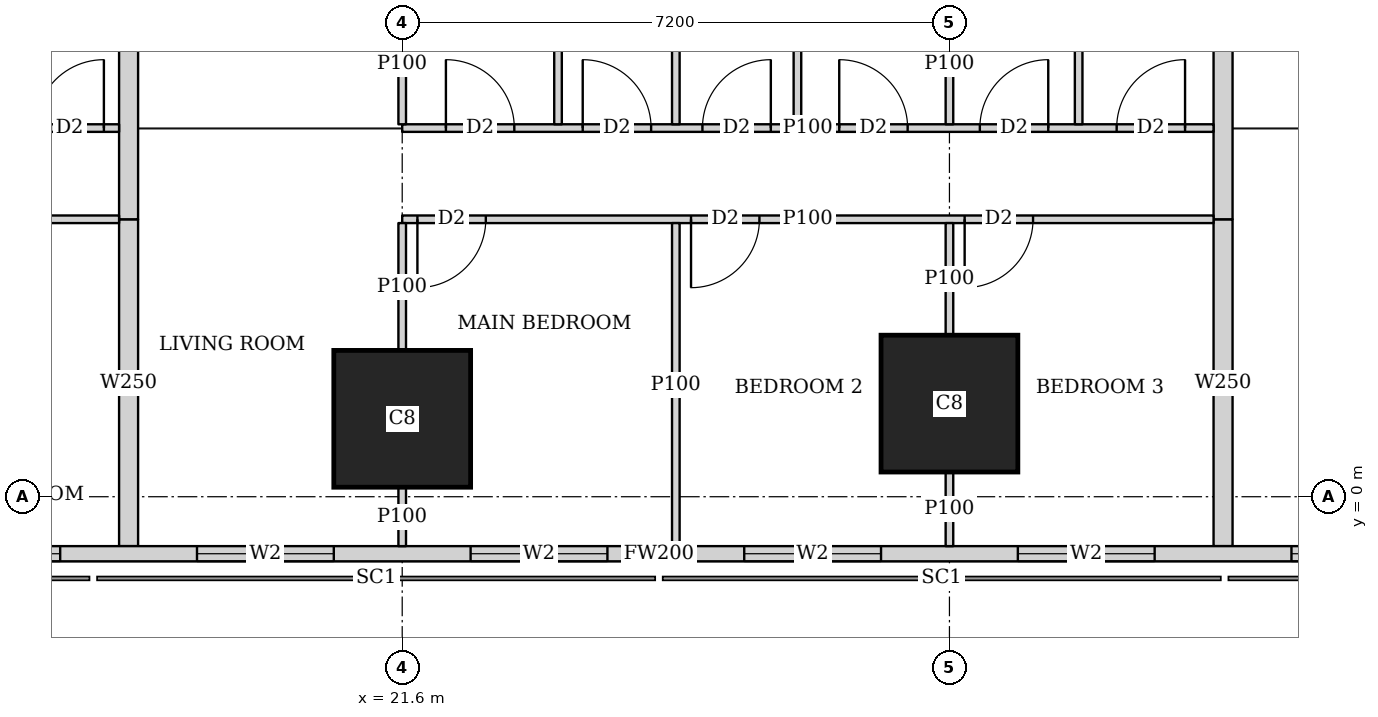
"""IFC4 building model, lengths in metres.
Left out: names, types, materials, properties, quantities, classifications, styles, units other than length and angle.
Written with IfcOpenShell. Run it as: python <this file> out.ifc"""

import sys

from ifc_helpers import new_model, si_unit, direction, frame, frame_2d, origin, origin_2d, place, context, subcontext, project, spatial, rectangle, extrude, element, fill, save


model = new_model("IFC4")
c1 = context("Model", 3, precision=1e-05, world=origin(), true_north=direction((0.0, 1.0)))
c2 = subcontext(c1, "Body", "Model", "MODEL_VIEW")
j1 = project(units=[si_unit("LENGTHUNIT", "METRE"), si_unit("PLANEANGLEUNIT", "RADIAN")], contexts=[c1])
p1 = place(None, origin())
s1 = spatial("IfcSite", under=j1, at=p1, CompositionType="ELEMENT")
p2 = place(p1, origin())
s2 = spatial("IfcBuilding", under=s1, at=p2, CompositionType="ELEMENT")
p3 = place(p2, frame((0.0, 0.0, 135.8)))
s3 = spatial("IfcBuildingStorey", under=s2, at=p3, CompositionType="ELEMENT", Elevation=135.8)
for number, where, z_axis, x_axis in (
    (1, (21.6, 1.025, 0.0), (0.0, 0.0, 1.0), (1.0, 0.0, 0.0)),
    (2, (28.8, 1.225, 0.0), (0.0, 0.0, 1.0), (1.0, 0.0, 0.0)),
):
    element("IfcColumn", number, at=place(p3, frame(where, z_axis=z_axis, x_axis=x_axis)), inside=s3, PredefinedType="COLUMN", context=c2, shape_type="SweptSolid", body=[
        extrude(rectangle(XDim=1.8, YDim=1.8, at=origin_2d()), origin(), (0.0, 0.0, 1.0), 3.75),
    ])
p4 = place(p3, frame((2.163, -0.75, 0.0), z_axis=(0.0, 0.0, 1.0), x_axis=(1.0, 0.0, 0.0)))
e3 = element("IfcWall", 3, at=p4, inside=s3, PredefinedType="SOLIDWALL", context=c2, shape_type="SweptSolid", body=[
    extrude(rectangle(XDim=45.628, YDim=0.2, at=frame_2d((22.814, 0.0))), origin(), (0.0, 0.0, 1.0), 3.5),
])
p5 = place(p4, frame((9.537, 0.0, 0.9)))
e4 = element("IfcOpeningElement", 4, at=p5, cuts=e3, PredefinedType="OPENING", context=c2, shape_type="SweptSolid", body=[
    extrude(rectangle(XDim=1.8, YDim=1.5, at=frame_2d((0.9, 0.75))), frame((0.0, 0.11, 0.0), z_axis=(0.0, -1.0, 0.0), x_axis=(1.0, 0.0, 0.0)), (0.0, 0.0, 1.0), 0.22),
])
p6 = place(p4, frame((13.137, 0.0, 0.9)))
e5 = element("IfcOpeningElement", 5, at=p6, cuts=e3, PredefinedType="OPENING", context=c2, shape_type="SweptSolid", body=[
    extrude(rectangle(XDim=1.8, YDim=1.5, at=frame_2d((0.9, 0.75))), frame((0.0, 0.11, 0.0), z_axis=(0.0, -1.0, 0.0), x_axis=(1.0, 0.0, 0.0)), (0.0, 0.0, 1.0), 0.22),
])
p7 = place(p4, frame((16.737, 0.0, 0.9)))
e6 = element("IfcOpeningElement", 6, at=p7, cuts=e3, PredefinedType="OPENING", context=c2, shape_type="SweptSolid", body=[
    extrude(rectangle(XDim=1.8, YDim=1.5, at=frame_2d((0.9, 0.75))), frame((0.0, 0.11, 0.0), z_axis=(0.0, -1.0, 0.0), x_axis=(1.0, 0.0, 0.0)), (0.0, 0.0, 1.0), 0.22),
])
p8 = place(p4, frame((20.337, 0.0, 0.9)))
e7 = element("IfcOpeningElement", 7, at=p8, cuts=e3, PredefinedType="OPENING", context=c2, shape_type="SweptSolid", body=[
    extrude(rectangle(XDim=1.8, YDim=1.5, at=frame_2d((0.9, 0.75))), frame((0.0, 0.11, 0.0), z_axis=(0.0, -1.0, 0.0), x_axis=(1.0, 0.0, 0.0)), (0.0, 0.0, 1.0), 0.22),
])
p9 = place(p4, frame((23.937, 0.0, 0.9)))
e8 = element("IfcOpeningElement", 8, at=p9, cuts=e3, PredefinedType="OPENING", context=c2, shape_type="SweptSolid", body=[
    extrude(rectangle(XDim=1.8, YDim=1.5, at=frame_2d((0.9, 0.75))), frame((0.0, 0.11, 0.0), z_axis=(0.0, -1.0, 0.0), x_axis=(1.0, 0.0, 0.0)), (0.0, 0.0, 1.0), 0.22),
])
p10 = place(p4, frame((27.537, 0.0, 0.9)))
e9 = element("IfcOpeningElement", 9, at=p10, cuts=e3, PredefinedType="OPENING", context=c2, shape_type="SweptSolid", body=[
    extrude(rectangle(XDim=1.8, YDim=1.5, at=frame_2d((0.9, 0.75))), frame((0.0, 0.11, 0.0), z_axis=(0.0, -1.0, 0.0), x_axis=(1.0, 0.0, 0.0)), (0.0, 0.0, 1.0), 0.22),
])
p11 = place(p4, frame((31.137, 0.0, 0.9)))
e10 = element("IfcOpeningElement", 10, at=p11, cuts=e3, PredefinedType="OPENING", context=c2, shape_type="SweptSolid", body=[
    extrude(rectangle(XDim=1.8, YDim=1.5, at=frame_2d((0.9, 0.75))), frame((0.0, 0.11, 0.0), z_axis=(0.0, -1.0, 0.0), x_axis=(1.0, 0.0, 0.0)), (0.0, 0.0, 1.0), 0.22),
])
p12 = place(p4, frame((34.737, 0.0, 0.9)))
e11 = element("IfcOpeningElement", 11, at=p12, cuts=e3, PredefinedType="OPENING", context=c2, shape_type="SweptSolid", body=[
    extrude(rectangle(XDim=1.8, YDim=1.5, at=frame_2d((0.9, 0.75))), frame((0.0, 0.11, 0.0), z_axis=(0.0, -1.0, 0.0), x_axis=(1.0, 0.0, 0.0)), (0.0, 0.0, 1.0), 0.22),
])
p13 = place(p3, frame((17.875, 3.65, 0.0), z_axis=(0.0, 0.0, 1.0), x_axis=(-1.0, 0.0, 0.0)))
e12 = element("IfcWall", 12, at=p13, inside=s3, PredefinedType="PARTITIONING", context=c2, shape_type="SweptSolid", body=[
    extrude(rectangle(XDim=3.475, YDim=0.1, at=frame_2d((1.738, 0.0))), origin(), (0.0, 0.0, 1.0), 3.5),
])
p14 = place(p13, frame((2.375, 0.0, 0.0)))
e13 = element("IfcOpeningElement", 13, at=p14, cuts=e12, PredefinedType="OPENING", context=c2, shape_type="SweptSolid", body=[
    extrude(rectangle(XDim=0.9, YDim=2.1, at=frame_2d((0.45, 1.05))), frame((0.0, 0.06, 0.0), z_axis=(0.0, -1.0, 0.0), x_axis=(1.0, 0.0, 0.0)), (0.0, 0.0, 1.0), 0.12),
])
p15 = place(p3, frame((17.875, 4.85, 0.0), z_axis=(0.0, 0.0, 1.0), x_axis=(-1.0, 0.0, 0.0)))
e14 = element("IfcWall", 14, at=p15, inside=s3, PredefinedType="PARTITIONING", context=c2, shape_type="SweptSolid", body=[
    extrude(rectangle(XDim=3.475, YDim=0.1, at=frame_2d((1.738, 0.0))), origin(), (0.0, 0.0, 1.0), 3.5),
])
p16 = place(p15, frame((2.0, 0.0, 0.0)))
e15 = element("IfcOpeningElement", 15, at=p16, cuts=e14, PredefinedType="OPENING", context=c2, shape_type="SweptSolid", body=[
    extrude(rectangle(XDim=0.9, YDim=2.1, at=frame_2d((0.45, 1.05))), frame((0.0, 0.06, 0.0), z_axis=(0.0, -1.0, 0.0), x_axis=(1.0, 0.0, 0.0)), (0.0, 0.0, 1.0), 0.12),
])
p17 = place(p15, frame((0.2, 0.0, 0.0)))
e16 = element("IfcOpeningElement", 16, at=p17, cuts=e14, PredefinedType="OPENING", context=c2, shape_type="SweptSolid", body=[
    extrude(rectangle(XDim=0.9, YDim=2.1, at=frame_2d((0.45, 1.05))), frame((0.0, 0.06, 0.0), z_axis=(0.0, -1.0, 0.0), x_axis=(1.0, 0.0, 0.0)), (0.0, 0.0, 1.0), 0.12),
])
p18 = place(p3, frame((32.275, 3.65, 0.0), z_axis=(0.0, 0.0, 1.0), x_axis=(-1.0, 0.0, 0.0)))
e17 = element("IfcWall", 17, at=p18, inside=s3, PredefinedType="PARTITIONING", context=c2, shape_type="SweptSolid", body=[
    extrude(rectangle(XDim=10.675, YDim=0.1, at=frame_2d((5.337, 0.0))), origin(), (0.0, 0.0, 1.0), 3.5),
])
p19 = place(p18, frame((9.575, 0.0, 0.0)))
e18 = element("IfcOpeningElement", 18, at=p19, cuts=e17, PredefinedType="OPENING", context=c2, shape_type="SweptSolid", body=[
    extrude(rectangle(XDim=0.9, YDim=2.1, at=frame_2d((0.45, 1.05))), frame((0.0, 0.06, 0.0), z_axis=(0.0, -1.0, 0.0), x_axis=(1.0, 0.0, 0.0)), (0.0, 0.0, 1.0), 0.12),
])
p20 = place(p18, frame((5.975, 0.0, 0.0)))
e19 = element("IfcOpeningElement", 19, at=p20, cuts=e17, PredefinedType="OPENING", context=c2, shape_type="SweptSolid", body=[
    extrude(rectangle(XDim=0.9, YDim=2.1, at=frame_2d((0.45, 1.05))), frame((0.0, 0.06, 0.0), z_axis=(0.0, -1.0, 0.0), x_axis=(1.0, 0.0, 0.0)), (0.0, 0.0, 1.0), 0.12),
])
p21 = place(p18, frame((2.375, 0.0, 0.0)))
e20 = element("IfcOpeningElement", 20, at=p21, cuts=e17, PredefinedType="OPENING", context=c2, shape_type="SweptSolid", body=[
    extrude(rectangle(XDim=0.9, YDim=2.1, at=frame_2d((0.45, 1.05))), frame((0.0, 0.06, 0.0), z_axis=(0.0, -1.0, 0.0), x_axis=(1.0, 0.0, 0.0)), (0.0, 0.0, 1.0), 0.12),
])
p22 = place(p3, frame((32.275, 4.85, 0.0), z_axis=(0.0, 0.0, 1.0), x_axis=(-1.0, 0.0, 0.0)))
e21 = element("IfcWall", 21, at=p22, inside=s3, PredefinedType="PARTITIONING", context=c2, shape_type="SweptSolid", body=[
    extrude(rectangle(XDim=10.675, YDim=0.1, at=frame_2d((5.337, 0.0))), origin(), (0.0, 0.0, 1.0), 3.5),
])
p23 = place(p22, frame((9.2, 0.0, 0.0)))
e22 = element("IfcOpeningElement", 22, at=p23, cuts=e21, PredefinedType="OPENING", context=c2, shape_type="SweptSolid", body=[
    extrude(rectangle(XDim=0.9, YDim=2.1, at=frame_2d((0.45, 1.05))), frame((0.0, 0.06, 0.0), z_axis=(0.0, -1.0, 0.0), x_axis=(1.0, 0.0, 0.0)), (0.0, 0.0, 1.0), 0.12),
])
p24 = place(p22, frame((5.825, 0.0, 0.0)))
e23 = element("IfcOpeningElement", 23, at=p24, cuts=e21, PredefinedType="OPENING", context=c2, shape_type="SweptSolid", body=[
    extrude(rectangle(XDim=0.9, YDim=2.1, at=frame_2d((0.45, 1.05))), frame((0.0, 0.06, 0.0), z_axis=(0.0, -1.0, 0.0), x_axis=(1.0, 0.0, 0.0)), (0.0, 0.0, 1.0), 0.12),
])
p25 = place(p22, frame((2.175, 0.0, 0.0)))
e24 = element("IfcOpeningElement", 24, at=p25, cuts=e21, PredefinedType="OPENING", context=c2, shape_type="SweptSolid", body=[
    extrude(rectangle(XDim=0.9, YDim=2.1, at=frame_2d((0.45, 1.05))), frame((0.0, 0.06, 0.0), z_axis=(0.0, -1.0, 0.0), x_axis=(1.0, 0.0, 0.0)), (0.0, 0.0, 1.0), 0.12),
])
p26 = place(p22, frame((7.4, 0.0, 0.0)))
e25 = element("IfcOpeningElement", 25, at=p26, cuts=e21, PredefinedType="OPENING", context=c2, shape_type="SweptSolid", body=[
    extrude(rectangle(XDim=0.9, YDim=2.1, at=frame_2d((0.45, 1.05))), frame((0.0, 0.06, 0.0), z_axis=(0.0, -1.0, 0.0), x_axis=(1.0, 0.0, 0.0)), (0.0, 0.0, 1.0), 0.12),
])
p27 = place(p22, frame((4.025, 0.0, 0.0)))
e26 = element("IfcOpeningElement", 26, at=p27, cuts=e21, PredefinedType="OPENING", context=c2, shape_type="SweptSolid", body=[
    extrude(rectangle(XDim=0.9, YDim=2.1, at=frame_2d((0.45, 1.05))), frame((0.0, 0.06, 0.0), z_axis=(0.0, -1.0, 0.0), x_axis=(1.0, 0.0, 0.0)), (0.0, 0.0, 1.0), 0.12),
])
p28 = place(p22, frame((0.375, 0.0, 0.0)))
e27 = element("IfcOpeningElement", 27, at=p28, cuts=e21, PredefinedType="OPENING", context=c2, shape_type="SweptSolid", body=[
    extrude(rectangle(XDim=0.9, YDim=2.1, at=frame_2d((0.45, 1.05))), frame((0.0, 0.06, 0.0), z_axis=(0.0, -1.0, 0.0), x_axis=(1.0, 0.0, 0.0)), (0.0, 0.0, 1.0), 0.12),
])
p29 = place(p3, frame((21.6, -0.65, 0.0), z_axis=(0.0, 0.0, 1.0), x_axis=(0.0, 1.0, 0.0)))
e28 = element("IfcWall", 28, at=p29, inside=s3, PredefinedType="PARTITIONING", context=c2, shape_type="SweptSolid", body=[
    extrude(rectangle(XDim=0.774, YDim=0.1, at=frame_2d((0.387, 0.0))), origin(), (0.0, 0.0, 1.0), 3.5),
])
p30 = place(p3, frame((21.6, 1.926, 0.0), z_axis=(0.0, 0.0, 1.0), x_axis=(0.0, 1.0, 0.0)))
e29 = element("IfcWall", 29, at=p30, inside=s3, PredefinedType="PARTITIONING", context=c2, shape_type="SweptSolid", body=[
    extrude(rectangle(XDim=1.674, YDim=0.1, at=frame_2d((0.837, 0.0))), origin(), (0.0, 0.0, 1.0), 3.5),
])
p31 = place(p3, frame((25.2, -0.65, 0.0), z_axis=(0.0, 0.0, 1.0), x_axis=(0.0, 1.0, 0.0)))
e30 = element("IfcWall", 30, at=p31, inside=s3, PredefinedType="PARTITIONING", context=c2, shape_type="SweptSolid", body=[
    extrude(rectangle(XDim=4.25, YDim=0.1, at=frame_2d((2.125, 0.0))), origin(), (0.0, 0.0, 1.0), 2.1),
])
p32 = place(p3, frame((28.8, -0.65, 0.0), z_axis=(0.0, 0.0, 1.0), x_axis=(0.0, 1.0, 0.0)))
e31 = element("IfcWall", 31, at=p32, inside=s3, PredefinedType="PARTITIONING", context=c2, shape_type="SweptSolid", body=[
    extrude(rectangle(XDim=0.974, YDim=0.1, at=frame_2d((0.487, 0.0))), origin(), (0.0, 0.0, 1.0), 3.5),
])
p33 = place(p3, frame((28.8, 2.126, 0.0), z_axis=(0.0, 0.0, 1.0), x_axis=(0.0, 1.0, 0.0)))
e32 = element("IfcWall", 32, at=p33, inside=s3, PredefinedType="PARTITIONING", context=c2, shape_type="SweptSolid", body=[
    extrude(rectangle(XDim=1.474, YDim=0.1, at=frame_2d((0.737, 0.0))), origin(), (0.0, 0.0, 1.0), 3.5),
])
p34 = place(p3, frame((21.6, 4.9, 0.0), z_axis=(0.0, 0.0, 1.0), x_axis=(0.0, 1.0, 0.0)))
e33 = element("IfcWall", 33, at=p34, inside=s3, PredefinedType="PARTITIONING", context=c2, shape_type="SweptSolid", body=[
    extrude(rectangle(XDim=1.599, YDim=0.1, at=frame_2d((0.8, 0.0))), origin(), (0.0, 0.0, 1.0), 3.5),
])
p35 = place(p3, frame((25.2, 4.9, 0.0), z_axis=(0.0, 0.0, 1.0), x_axis=(0.0, 1.0, 0.0)))
e34 = element("IfcWall", 34, at=p35, inside=s3, PredefinedType="PARTITIONING", context=c2, shape_type="SweptSolid", body=[
    extrude(rectangle(XDim=3.525, YDim=0.1, at=frame_2d((1.763, 0.0))), origin(), (0.0, 0.0, 1.0), 3.5),
])
p36 = place(p3, frame((28.8, 4.9, 0.0), z_axis=(0.0, 0.0, 1.0), x_axis=(0.0, 1.0, 0.0)))
e35 = element("IfcWall", 35, at=p36, inside=s3, PredefinedType="PARTITIONING", context=c2, shape_type="SweptSolid", body=[
    extrude(rectangle(XDim=1.599, YDim=0.1, at=frame_2d((0.8, 0.0))), origin(), (0.0, 0.0, 1.0), 3.5),
])
for number, where, z_axis, x_axis in (
    (36, (23.65, 4.9, 0.0), (0.0, 0.0, 1.0), (0.0, 1.0, 0.0)),
    (37, (26.8, 4.9, 0.0), (0.0, 0.0, 1.0), (0.0, 1.0, 0.0)),
    (38, (30.5, 4.9, 0.0), (0.0, 0.0, 1.0), (0.0, 1.0, 0.0)),
):
    element("IfcWall", number, at=place(p3, frame(where, z_axis=z_axis, x_axis=x_axis)), inside=s3, PredefinedType="PARTITIONING", context=c2, shape_type="SweptSolid", body=[
        extrude(rectangle(XDim=3.525, YDim=0.1, at=frame_2d((1.763, 0.0))), origin(), (0.0, 0.0, 1.0), 3.5),
    ])
p37 = place(p3, frame((18.0, -0.65, 0.0), z_axis=(0.0, 0.0, 1.0), x_axis=(0.0, 1.0, 0.0)))
e39 = element("IfcWall", 39, at=p37, inside=s3, PredefinedType="SOLIDWALL", context=c2, shape_type="SweptSolid", body=[
    extrude(rectangle(XDim=4.3, YDim=0.25, at=frame_2d((2.15, 0.0))), origin(), (0.0, 0.0, 1.0), 2.1),
])
p38 = place(p3, frame((18.0, 3.65, 0.0), z_axis=(0.0, 0.0, 1.0), x_axis=(0.0, 1.0, 0.0)))
e40 = element("IfcWall", 40, at=p38, inside=s3, PredefinedType="SOLIDWALL", context=c2, shape_type="SweptSolid", body=[
    extrude(rectangle(XDim=4.775, YDim=0.25, at=frame_2d((2.388, 0.0))), origin(), (0.0, 0.0, 1.0), 3.5),
])
p39 = place(p3, frame((32.4, -0.65, 0.0), z_axis=(0.0, 0.0, 1.0), x_axis=(0.0, 1.0, 0.0)))
e41 = element("IfcWall", 41, at=p39, inside=s3, PredefinedType="SOLIDWALL", context=c2, shape_type="SweptSolid", body=[
    extrude(rectangle(XDim=4.3, YDim=0.25, at=frame_2d((2.15, 0.0))), origin(), (0.0, 0.0, 1.0), 2.1),
])
p40 = place(p3, frame((32.4, 3.65, 0.0), z_axis=(0.0, 0.0, 1.0), x_axis=(0.0, 1.0, 0.0)))
e42 = element("IfcWall", 42, at=p40, inside=s3, PredefinedType="SOLIDWALL", context=c2, shape_type="SweptSolid", body=[
    extrude(rectangle(XDim=4.775, YDim=0.25, at=frame_2d((2.388, 0.0))), origin(), (0.0, 0.0, 1.0), 3.5),
])
p41 = place(p6, origin())
e43 = element("IfcWindow", 43, at=p41, inside=s3, PartitioningType="SINGLE_PANEL", PredefinedType="WINDOW", context=c2, shape_type="SweptSolid", body=[
    extrude(rectangle(XDim=1.8, YDim=1.5, at=frame_2d((0.9, 0.75))), frame((0.0, 0.03, 0.0), z_axis=(0.0, -1.0, 0.0), x_axis=(1.0, 0.0, 0.0)), (0.0, 0.0, 1.0), 0.06),
])
fill(e5, e43)
p42 = place(p7, origin())
e44 = element("IfcWindow", 44, at=p42, inside=s3, PartitioningType="SINGLE_PANEL", PredefinedType="WINDOW", context=c2, shape_type="SweptSolid", body=[
    extrude(rectangle(XDim=1.8, YDim=1.5, at=frame_2d((0.9, 0.75))), frame((0.0, 0.03, 0.0), z_axis=(0.0, -1.0, 0.0), x_axis=(1.0, 0.0, 0.0)), (0.0, 0.0, 1.0), 0.06),
])
fill(e6, e44)
p43 = place(p8, origin())
e45 = element("IfcWindow", 45, at=p43, inside=s3, PartitioningType="SINGLE_PANEL", PredefinedType="WINDOW", context=c2, shape_type="SweptSolid", body=[
    extrude(rectangle(XDim=1.8, YDim=1.5, at=frame_2d((0.9, 0.75))), frame((0.0, 0.03, 0.0), z_axis=(0.0, -1.0, 0.0), x_axis=(1.0, 0.0, 0.0)), (0.0, 0.0, 1.0), 0.06),
])
fill(e7, e45)
p44 = place(p9, origin())
e46 = element("IfcWindow", 46, at=p44, inside=s3, PartitioningType="SINGLE_PANEL", PredefinedType="WINDOW", context=c2, shape_type="SweptSolid", body=[
    extrude(rectangle(XDim=1.8, YDim=1.5, at=frame_2d((0.9, 0.75))), frame((0.0, 0.03, 0.0), z_axis=(0.0, -1.0, 0.0), x_axis=(1.0, 0.0, 0.0)), (0.0, 0.0, 1.0), 0.06),
])
fill(e8, e46)
p45 = place(p10, origin())
e47 = element("IfcWindow", 47, at=p45, inside=s3, PartitioningType="SINGLE_PANEL", PredefinedType="WINDOW", context=c2, shape_type="SweptSolid", body=[
    extrude(rectangle(XDim=1.8, YDim=1.5, at=frame_2d((0.9, 0.75))), frame((0.0, 0.03, 0.0), z_axis=(0.0, -1.0, 0.0), x_axis=(1.0, 0.0, 0.0)), (0.0, 0.0, 1.0), 0.06),
])
fill(e9, e47)
p46 = place(p11, origin())
e48 = element("IfcWindow", 48, at=p46, inside=s3, PartitioningType="SINGLE_PANEL", PredefinedType="WINDOW", context=c2, shape_type="SweptSolid", body=[
    extrude(rectangle(XDim=1.8, YDim=1.5, at=frame_2d((0.9, 0.75))), frame((0.0, 0.03, 0.0), z_axis=(0.0, -1.0, 0.0), x_axis=(1.0, 0.0, 0.0)), (0.0, 0.0, 1.0), 0.06),
])
fill(e10, e48)
p47 = place(p17, origin())
e49 = element("IfcDoor", 49, at=p47, inside=s3, OperationType="SINGLE_SWING_RIGHT", PredefinedType="DOOR", context=c2, shape_type="SweptSolid", body=[
    extrude(rectangle(XDim=0.9, YDim=2.1, at=frame_2d((0.45, 1.05))), frame((0.0, 0.025, 0.0), z_axis=(0.0, -1.0, 0.0), x_axis=(1.0, 0.0, 0.0)), (0.0, 0.0, 1.0), 0.05),
])
fill(e16, e49)
p48 = place(p19, origin())
e50 = element("IfcDoor", 50, at=p48, inside=s3, OperationType="SINGLE_SWING_RIGHT", PredefinedType="DOOR", context=c2, shape_type="SweptSolid", body=[
    extrude(rectangle(XDim=0.9, YDim=2.1, at=frame_2d((0.45, 1.05))), frame((0.0, 0.025, 0.0), z_axis=(0.0, -1.0, 0.0), x_axis=(1.0, 0.0, 0.0)), (0.0, 0.0, 1.0), 0.05),
])
fill(e18, e50)
p49 = place(p20, origin())
e51 = element("IfcDoor", 51, at=p49, inside=s3, OperationType="SINGLE_SWING_RIGHT", PredefinedType="DOOR", context=c2, shape_type="SweptSolid", body=[
    extrude(rectangle(XDim=0.9, YDim=2.1, at=frame_2d((0.45, 1.05))), frame((0.0, 0.025, 0.0), z_axis=(0.0, -1.0, 0.0), x_axis=(1.0, 0.0, 0.0)), (0.0, 0.0, 1.0), 0.05),
])
fill(e19, e51)
p50 = place(p21, origin())
e52 = element("IfcDoor", 52, at=p50, inside=s3, OperationType="SINGLE_SWING_RIGHT", PredefinedType="DOOR", context=c2, shape_type="SweptSolid", body=[
    extrude(rectangle(XDim=0.9, YDim=2.1, at=frame_2d((0.45, 1.05))), frame((0.0, 0.025, 0.0), z_axis=(0.0, -1.0, 0.0), x_axis=(1.0, 0.0, 0.0)), (0.0, 0.0, 1.0), 0.05),
])
fill(e20, e52)
p51 = place(p23, origin())
e53 = element("IfcDoor", 53, at=p51, inside=s3, OperationType="SINGLE_SWING_LEFT", PredefinedType="DOOR", context=c2, shape_type="SweptSolid", body=[
    extrude(rectangle(XDim=0.9, YDim=2.1, at=frame_2d((0.45, 1.05))), frame((0.0, 0.025, 0.0), z_axis=(0.0, -1.0, 0.0), x_axis=(1.0, 0.0, 0.0)), (0.0, 0.0, 1.0), 0.05),
])
fill(e22, e53)
p52 = place(p24, origin())
e54 = element("IfcDoor", 54, at=p52, inside=s3, OperationType="SINGLE_SWING_RIGHT", PredefinedType="DOOR", context=c2, shape_type="SweptSolid", body=[
    extrude(rectangle(XDim=0.9, YDim=2.1, at=frame_2d((0.45, 1.05))), frame((0.0, 0.025, 0.0), z_axis=(0.0, -1.0, 0.0), x_axis=(1.0, 0.0, 0.0)), (0.0, 0.0, 1.0), 0.05),
])
fill(e23, e54)
p53 = place(p25, origin())
e55 = element("IfcDoor", 55, at=p53, inside=s3, OperationType="SINGLE_SWING_RIGHT", PredefinedType="DOOR", context=c2, shape_type="SweptSolid", body=[
    extrude(rectangle(XDim=0.9, YDim=2.1, at=frame_2d((0.45, 1.05))), frame((0.0, 0.025, 0.0), z_axis=(0.0, -1.0, 0.0), x_axis=(1.0, 0.0, 0.0)), (0.0, 0.0, 1.0), 0.05),
])
fill(e24, e55)
p54 = place(p26, origin())
e56 = element("IfcDoor", 56, at=p54, inside=s3, OperationType="SINGLE_SWING_LEFT", PredefinedType="DOOR", context=c2, shape_type="SweptSolid", body=[
    extrude(rectangle(XDim=0.9, YDim=2.1, at=frame_2d((0.45, 1.05))), frame((0.0, 0.025, 0.0), z_axis=(0.0, -1.0, 0.0), x_axis=(1.0, 0.0, 0.0)), (0.0, 0.0, 1.0), 0.05),
])
fill(e25, e56)
p55 = place(p27, origin())
e57 = element("IfcDoor", 57, at=p55, inside=s3, OperationType="SINGLE_SWING_LEFT", PredefinedType="DOOR", context=c2, shape_type="SweptSolid", body=[
    extrude(rectangle(XDim=0.9, YDim=2.1, at=frame_2d((0.45, 1.05))), frame((0.0, 0.025, 0.0), z_axis=(0.0, -1.0, 0.0), x_axis=(1.0, 0.0, 0.0)), (0.0, 0.0, 1.0), 0.05),
])
fill(e26, e57)
p56 = place(p28, origin())
e58 = element("IfcDoor", 58, at=p56, inside=s3, OperationType="SINGLE_SWING_RIGHT", PredefinedType="DOOR", context=c2, shape_type="SweptSolid", body=[
    extrude(rectangle(XDim=0.9, YDim=2.1, at=frame_2d((0.45, 1.05))), frame((0.0, 0.025, 0.0), z_axis=(0.0, -1.0, 0.0), x_axis=(1.0, 0.0, 0.0)), (0.0, 0.0, 1.0), 0.05),
])
fill(e27, e58)
save(model, sys.argv[1])
